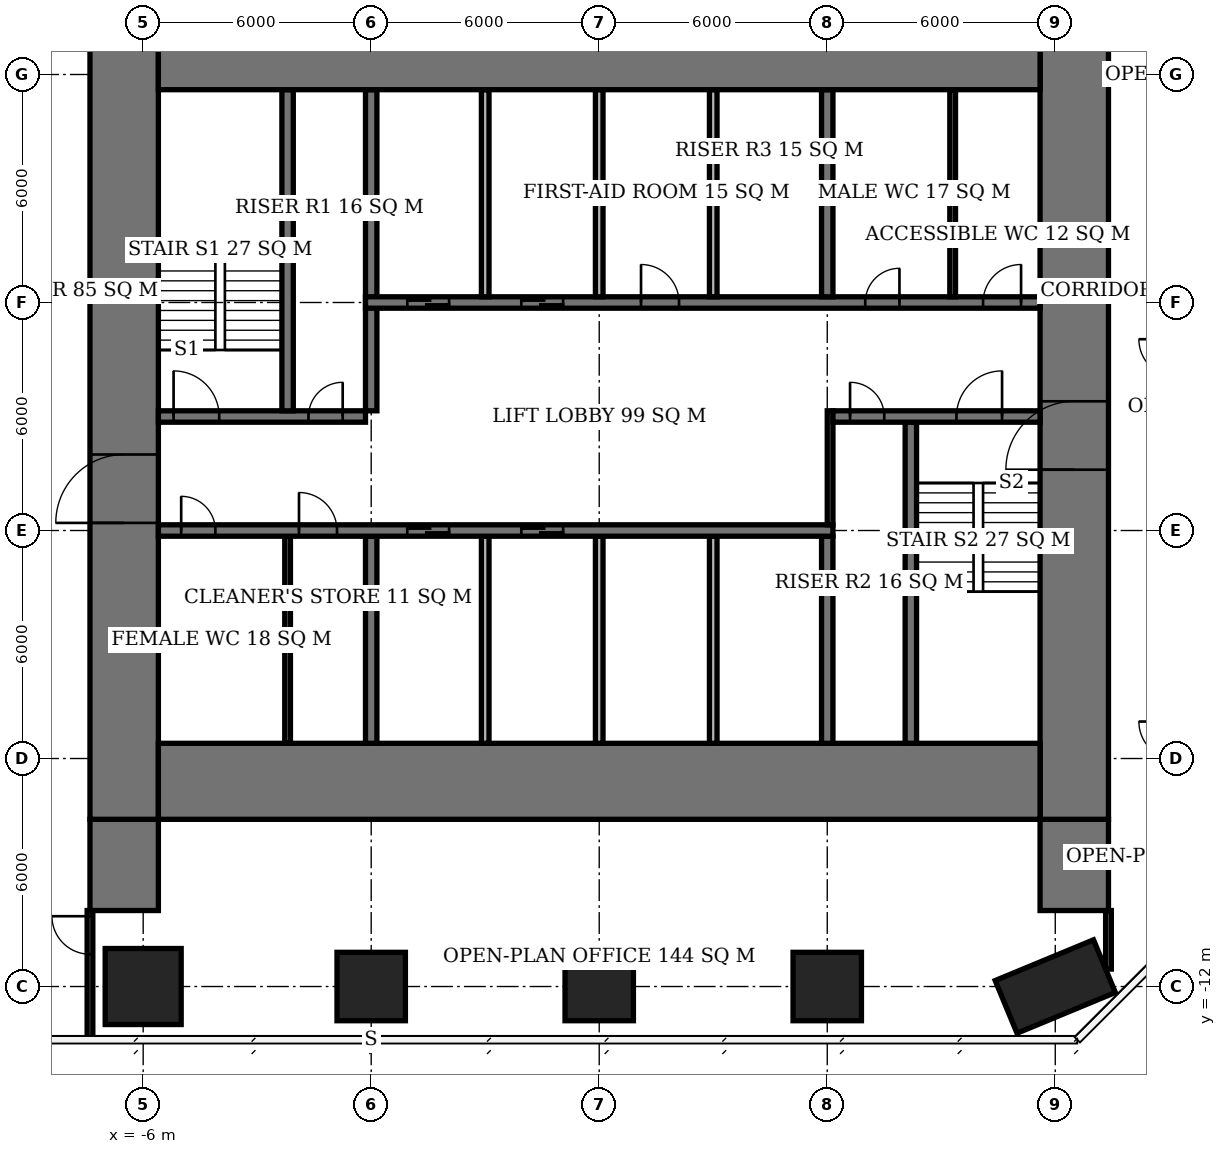
"""IFC4 building model, lengths in metres.
Left out: names, types, materials, properties, quantities, classifications, styles, units other than length and angle.
Written with IfcOpenShell. Run it as: python <this file> out.ifc"""

import sys

from ifc_helpers import new_model, si_unit, direction, frame, frame_2d, origin, origin_2d, place, context, subcontext, project, spatial, rectangle, extrude, element, fill, save


model = new_model("IFC4")
c1 = context("Model", 3, precision=1e-05, world=origin(), true_north=direction((0.0, 1.0)))
c2 = subcontext(c1, "Body", "Model", "MODEL_VIEW")
j1 = project(units=[si_unit("LENGTHUNIT", "METRE"), si_unit("PLANEANGLEUNIT", "RADIAN")], contexts=[c1])
p1 = place(None, origin())
s1 = spatial("IfcSite", under=j1, at=p1, CompositionType="ELEMENT")
p2 = place(p1, origin())
s2 = spatial("IfcBuilding", under=s1, at=p2, CompositionType="ELEMENT")
p3 = place(p2, frame((0.0, 0.0, 101.6)))
s3 = spatial("IfcBuildingStorey", under=s2, at=p3, CompositionType="ELEMENT", Elevation=101.6)
p4 = place(p3, frame((-6.0, -12.0, 0.0), z_axis=(0.0, 0.0, 1.0), x_axis=(1.0, 0.0, 0.0)))
e1 = element("IfcColumn", 1, at=p4, inside=s3, PredefinedType="COLUMN", context=c2, shape_type="SweptSolid", body=[
    extrude(rectangle(XDim=2.0, YDim=2.0, at=origin_2d()), origin(), (0.0, 0.0, 1.0), 3.9),
])
for number, where, z_axis, x_axis in (
    (2, (0.0, -12.0, 0.0), (0.0, 0.0, 1.0), (1.0, 0.0, 0.0)),
    (3, (6.0, -12.0, 0.0), (0.0, 0.0, 1.0), (1.0, 0.0, 0.0)),
    (4, (12.0, -12.0, 0.0), (0.0, 0.0, 1.0), (1.0, 0.0, 0.0)),
):
    element("IfcColumn", number, at=place(p3, frame(where, z_axis=z_axis, x_axis=x_axis)), inside=s3, PredefinedType="COLUMN", context=c2, shape_type="SweptSolid", body=[
        extrude(rectangle(XDim=1.8, YDim=1.8, at=origin_2d()), origin(), (0.0, 0.0, 1.0), 3.9),
    ])
p5 = place(p3, frame((18.0, -12.0, 0.0), z_axis=(0.0, 0.0, 1.0), x_axis=(-0.923879532511, -0.382683432365, 0.0)))
e5 = element("IfcColumn", 5, at=p5, inside=s3, PredefinedType="COLUMN", context=c2, shape_type="SweptSolid", body=[
    extrude(rectangle(XDim=2.8, YDim=1.5, at=origin_2d()), origin(), (0.0, 0.0, 1.0), 3.9),
])
for number, where, z_axis, x_axis in (
    (6, (-5.6, -6.6, 0.0), (0.0, 0.0, 1.0), (1.0, 0.0, 0.0)),
    (7, (-5.6, 12.6, 0.0), (0.0, 0.0, 1.0), (1.0, 0.0, 0.0)),
):
    element("IfcWall", number, at=place(p3, frame(where, z_axis=z_axis, x_axis=x_axis)), inside=s3, PredefinedType="SHEAR", context=c2, shape_type="SweptSolid", body=[
        extrude(rectangle(XDim=23.2, YDim=2.0, at=frame_2d((11.6, 0.0))), origin(), (0.0, 0.0, 1.0), 3.9),
    ])
p6 = place(p3, frame((-6.5, -7.6, 0.0), z_axis=(0.0, 0.0, 1.0), x_axis=(0.0, 1.0, 0.0)))
e8 = element("IfcWall", 8, at=p6, inside=s3, PredefinedType="SHEAR", context=c2, shape_type="SweptSolid", body=[
    extrude(rectangle(XDim=21.2, YDim=1.8, at=frame_2d((10.6, 0.0))), origin(), (0.0, 0.0, 1.0), 3.9),
])
p7 = place(p6, frame((7.8, 0.0, 0.0)))
e9 = element("IfcOpeningElement", 9, at=p7, cuts=e8, PredefinedType="OPENING", context=c2, shape_type="SweptSolid", body=[
    extrude(rectangle(XDim=1.8, YDim=2.4, at=frame_2d((0.9, 1.2))), frame((0.0, 0.91, 0.0), z_axis=(0.0, -1.0, 0.0), x_axis=(1.0, 0.0, 0.0)), (0.0, 0.0, 1.0), 1.82),
])
p8 = place(p3, frame((18.5, -7.6, 0.0), z_axis=(0.0, 0.0, 1.0), x_axis=(0.0, 1.0, 0.0)))
e10 = element("IfcWall", 10, at=p8, inside=s3, PredefinedType="SHEAR", context=c2, shape_type="SweptSolid", body=[
    extrude(rectangle(XDim=21.2, YDim=1.8, at=frame_2d((10.6, 0.0))), origin(), (0.0, 0.0, 1.0), 3.9),
])
p9 = place(p8, frame((9.2, 0.0, 0.0)))
e11 = element("IfcOpeningElement", 11, at=p9, cuts=e10, PredefinedType="OPENING", context=c2, shape_type="SweptSolid", body=[
    extrude(rectangle(XDim=1.8, YDim=2.4, at=frame_2d((0.9, 1.2))), frame((0.0, 0.91, 0.0), z_axis=(0.0, -1.0, 0.0), x_axis=(1.0, 0.0, 0.0)), (0.0, 0.0, 1.0), 1.82),
])
for number, where, z_axis, x_axis in (
    (12, (-6.5, -10.0, 0.0), (0.0, 0.0, 1.0), (0.0, 1.0, 0.0)),
    (13, (18.5, -10.0, 0.0), (0.0, 0.0, 1.0), (0.0, 1.0, 0.0)),
):
    element("IfcWall", number, at=place(p3, frame(where, z_axis=z_axis, x_axis=x_axis)), inside=s3, PredefinedType="SHEAR", context=c2, shape_type="SweptSolid", body=[
        extrude(rectangle(XDim=2.4, YDim=1.8, at=frame_2d((1.2, 0.0))), origin(), (0.0, 0.0, 1.0), 3.9),
    ])
p10 = place(p3, frame((-5.6, 0.0, 0.0), z_axis=(0.0, 0.0, 1.0), x_axis=(1.0, 0.0, 0.0)))
e14 = element("IfcWall", 14, at=p10, inside=s3, PredefinedType="SHEAR", context=c2, shape_type="SweptSolid", body=[
    extrude(rectangle(XDim=17.75, YDim=0.3, at=frame_2d((8.875, 0.0))), origin(), (0.0, 0.0, 1.0), 3.9),
])
p11 = place(p10, frame((0.6, 0.0, 0.0)))
e15 = element("IfcOpeningElement", 15, at=p11, cuts=e14, PredefinedType="OPENING", context=c2, shape_type="SweptSolid", body=[
    extrude(rectangle(XDim=0.9, YDim=2.1, at=frame_2d((0.45, 1.05))), frame((0.0, 0.16, 0.0), z_axis=(0.0, -1.0, 0.0), x_axis=(1.0, 0.0, 0.0)), (0.0, 0.0, 1.0), 0.32),
])
p12 = place(p10, frame((3.7, 0.0, 0.0)))
e16 = element("IfcOpeningElement", 16, at=p12, cuts=e14, PredefinedType="OPENING", context=c2, shape_type="SweptSolid", body=[
    extrude(rectangle(XDim=1.0, YDim=2.1, at=frame_2d((0.5, 1.05))), frame((0.0, 0.16, 0.0), z_axis=(0.0, -1.0, 0.0), x_axis=(1.0, 0.0, 0.0)), (0.0, 0.0, 1.0), 0.32),
])
p13 = place(p10, frame((6.55, 0.0, 0.0)))
e17 = element("IfcOpeningElement", 17, at=p13, cuts=e14, PredefinedType="OPENING", context=c2, shape_type="SweptSolid", body=[
    extrude(rectangle(XDim=1.1, YDim=2.1, at=frame_2d((0.55, 1.05))), frame((0.0, 0.16, 0.0), z_axis=(0.0, -1.0, 0.0), x_axis=(1.0, 0.0, 0.0)), (0.0, 0.0, 1.0), 0.32),
])
p14 = place(p10, frame((9.55, 0.0, 0.0)))
e18 = element("IfcOpeningElement", 18, at=p14, cuts=e14, PredefinedType="OPENING", context=c2, shape_type="SweptSolid", body=[
    extrude(rectangle(XDim=1.1, YDim=2.1, at=frame_2d((0.55, 1.05))), frame((0.0, 0.16, 0.0), z_axis=(0.0, -1.0, 0.0), x_axis=(1.0, 0.0, 0.0)), (0.0, 0.0, 1.0), 0.32),
])
p15 = place(p3, frame((-5.6, 3.0, 0.0), z_axis=(0.0, 0.0, 1.0), x_axis=(1.0, 0.0, 0.0)))
e19 = element("IfcWall", 19, at=p15, inside=s3, PredefinedType="SHEAR", context=c2, shape_type="SweptSolid", body=[
    extrude(rectangle(XDim=5.45, YDim=0.3, at=frame_2d((2.725, 0.0))), origin(), (0.0, 0.0, 1.0), 3.9),
])
p16 = place(p15, frame((0.4, 0.0, 0.0)))
e20 = element("IfcOpeningElement", 20, at=p16, cuts=e19, PredefinedType="OPENING", context=c2, shape_type="SweptSolid", body=[
    extrude(rectangle(XDim=1.2, YDim=2.1, at=frame_2d((0.6, 1.05))), frame((0.0, 0.16, 0.0), z_axis=(0.0, -1.0, 0.0), x_axis=(1.0, 0.0, 0.0)), (0.0, 0.0, 1.0), 0.32),
])
p17 = place(p15, frame((3.95, 0.0, 0.0)))
e21 = element("IfcOpeningElement", 21, at=p17, cuts=e19, PredefinedType="OPENING", context=c2, shape_type="SweptSolid", body=[
    extrude(rectangle(XDim=0.9, YDim=2.1, at=frame_2d((0.45, 1.05))), frame((0.0, 0.16, 0.0), z_axis=(0.0, -1.0, 0.0), x_axis=(1.0, 0.0, 0.0)), (0.0, 0.0, 1.0), 0.32),
])
p18 = place(p3, frame((12.15, 3.0, 0.0), z_axis=(0.0, 0.0, 1.0), x_axis=(1.0, 0.0, 0.0)))
e22 = element("IfcWall", 22, at=p18, inside=s3, PredefinedType="SHEAR", context=c2, shape_type="SweptSolid", body=[
    extrude(rectangle(XDim=5.45, YDim=0.3, at=frame_2d((2.725, 0.0))), origin(), (0.0, 0.0, 1.0), 3.9),
])
p19 = place(p18, frame((3.25, 0.0, 0.0)))
e23 = element("IfcOpeningElement", 23, at=p19, cuts=e22, PredefinedType="OPENING", context=c2, shape_type="SweptSolid", body=[
    extrude(rectangle(XDim=1.2, YDim=2.1, at=frame_2d((0.6, 1.05))), frame((0.0, 0.16, 0.0), z_axis=(0.0, -1.0, 0.0), x_axis=(1.0, 0.0, 0.0)), (0.0, 0.0, 1.0), 0.32),
])
p20 = place(p18, frame((0.45, 0.0, 0.0)))
e24 = element("IfcOpeningElement", 24, at=p20, cuts=e22, PredefinedType="OPENING", context=c2, shape_type="SweptSolid", body=[
    extrude(rectangle(XDim=0.9, YDim=2.1, at=frame_2d((0.45, 1.05))), frame((0.0, 0.16, 0.0), z_axis=(0.0, -1.0, 0.0), x_axis=(1.0, 0.0, 0.0)), (0.0, 0.0, 1.0), 0.32),
])
p21 = place(p3, frame((-0.15, 6.0, 0.0), z_axis=(0.0, 0.0, 1.0), x_axis=(1.0, 0.0, 0.0)))
e25 = element("IfcWall", 25, at=p21, inside=s3, PredefinedType="SHEAR", context=c2, shape_type="SweptSolid", body=[
    extrude(rectangle(XDim=17.75, YDim=0.3, at=frame_2d((8.875, 0.0))), origin(), (0.0, 0.0, 1.0), 3.9),
])
p22 = place(p21, frame((13.15, 0.0, 0.0)))
e26 = element("IfcOpeningElement", 26, at=p22, cuts=e25, PredefinedType="OPENING", context=c2, shape_type="SweptSolid", body=[
    extrude(rectangle(XDim=0.9, YDim=2.1, at=frame_2d((0.45, 1.05))), frame((0.0, 0.16, 0.0), z_axis=(0.0, -1.0, 0.0), x_axis=(1.0, 0.0, 0.0)), (0.0, 0.0, 1.0), 0.32),
])
p23 = place(p21, frame((16.25, 0.0, 0.0)))
e27 = element("IfcOpeningElement", 27, at=p23, cuts=e25, PredefinedType="OPENING", context=c2, shape_type="SweptSolid", body=[
    extrude(rectangle(XDim=1.0, YDim=2.1, at=frame_2d((0.5, 1.05))), frame((0.0, 0.16, 0.0), z_axis=(0.0, -1.0, 0.0), x_axis=(1.0, 0.0, 0.0)), (0.0, 0.0, 1.0), 0.32),
])
p24 = place(p21, frame((7.25, 0.0, 0.0)))
e28 = element("IfcOpeningElement", 28, at=p24, cuts=e25, PredefinedType="OPENING", context=c2, shape_type="SweptSolid", body=[
    extrude(rectangle(XDim=1.0, YDim=2.1, at=frame_2d((0.5, 1.05))), frame((0.0, 0.16, 0.0), z_axis=(0.0, -1.0, 0.0), x_axis=(1.0, 0.0, 0.0)), (0.0, 0.0, 1.0), 0.32),
])
p25 = place(p21, frame((1.1, 0.0, 0.0)))
e29 = element("IfcOpeningElement", 29, at=p25, cuts=e25, PredefinedType="OPENING", context=c2, shape_type="SweptSolid", body=[
    extrude(rectangle(XDim=1.1, YDim=2.1, at=frame_2d((0.55, 1.05))), frame((0.0, 0.16, 0.0), z_axis=(0.0, -1.0, 0.0), x_axis=(1.0, 0.0, 0.0)), (0.0, 0.0, 1.0), 0.32),
])
p26 = place(p21, frame((4.1, 0.0, 0.0)))
e30 = element("IfcOpeningElement", 30, at=p26, cuts=e25, PredefinedType="OPENING", context=c2, shape_type="SweptSolid", body=[
    extrude(rectangle(XDim=1.1, YDim=2.1, at=frame_2d((0.55, 1.05))), frame((0.0, 0.16, 0.0), z_axis=(0.0, -1.0, 0.0), x_axis=(1.0, 0.0, 0.0)), (0.0, 0.0, 1.0), 0.32),
])
p27 = place(p3, frame((0.0, -5.6, 0.0), z_axis=(0.0, 0.0, 1.0), x_axis=(0.0, 1.0, 0.0)))
e31 = element("IfcWall", 31, at=p27, inside=s3, PredefinedType="SHEAR", context=c2, shape_type="SweptSolid", body=[
    extrude(rectangle(XDim=5.45, YDim=0.3, at=frame_2d((2.725, 0.0))), origin(), (0.0, 0.0, 1.0), 3.9),
])
p28 = place(p3, frame((0.0, 3.15, 0.0), z_axis=(0.0, 0.0, 1.0), x_axis=(0.0, 1.0, 0.0)))
e32 = element("IfcWall", 32, at=p28, inside=s3, PredefinedType="SHEAR", context=c2, shape_type="SweptSolid", body=[
    extrude(rectangle(XDim=8.45, YDim=0.3, at=frame_2d((4.225, 0.0))), origin(), (0.0, 0.0, 1.0), 3.9),
])
for number, where, z_axis, x_axis in (
    (33, (12.0, -5.6, 0.0), (0.0, 0.0, 1.0), (0.0, 1.0, 0.0)),
    (34, (12.0, 6.15, 0.0), (0.0, 0.0, 1.0), (0.0, 1.0, 0.0)),
):
    element("IfcWall", number, at=place(p3, frame(where, z_axis=z_axis, x_axis=x_axis)), inside=s3, PredefinedType="SHEAR", context=c2, shape_type="SweptSolid", body=[
        extrude(rectangle(XDim=5.45, YDim=0.3, at=frame_2d((2.725, 0.0))), origin(), (0.0, 0.0, 1.0), 3.9),
    ])
for number, where, z_axis, x_axis in (
    (35, (-2.2, 3.15, 0.0), (0.0, 0.0, 1.0), (0.0, 1.0, 0.0)),
    (36, (14.2, -5.6, 0.0), (0.0, 0.0, 1.0), (0.0, 1.0, 0.0)),
):
    element("IfcWall", number, at=place(p3, frame(where, z_axis=z_axis, x_axis=x_axis)), inside=s3, PredefinedType="SHEAR", context=c2, shape_type="SweptSolid", body=[
        extrude(rectangle(XDim=8.45, YDim=0.3, at=frame_2d((4.225, 0.0))), origin(), (0.0, 0.0, 1.0), 3.9),
    ])
for number, where, z_axis, x_axis in (
    (37, (3.0, 6.15, 0.0), (0.0, 0.0, 1.0), (0.0, 1.0, 0.0)),
    (38, (6.0, 6.15, 0.0), (0.0, 0.0, 1.0), (0.0, 1.0, 0.0)),
    (39, (9.0, 6.15, 0.0), (0.0, 0.0, 1.0), (0.0, 1.0, 0.0)),
    (40, (3.0, -5.6, 0.0), (0.0, 0.0, 1.0), (0.0, 1.0, 0.0)),
    (41, (6.0, -5.6, 0.0), (0.0, 0.0, 1.0), (0.0, 1.0, 0.0)),
    (42, (9.0, -5.6, 0.0), (0.0, 0.0, 1.0), (0.0, 1.0, 0.0)),
):
    element("IfcWall", number, at=place(p3, frame(where, z_axis=z_axis, x_axis=x_axis)), inside=s3, PredefinedType="SOLIDWALL", context=c2, shape_type="SweptSolid", body=[
        extrude(rectangle(XDim=5.45, YDim=0.2, at=frame_2d((2.725, 0.0))), origin(), (0.0, 0.0, 1.0), 3.9),
    ])
for number, where, z_axis, x_axis in (
    (43, (-2.2, -5.6, 0.0), (0.0, 0.0, 1.0), (0.0, 1.0, 0.0)),
    (44, (15.3, 6.15, 0.0), (0.0, 0.0, 1.0), (0.0, 1.0, 0.0)),
):
    element("IfcWall", number, at=place(p3, frame(where, z_axis=z_axis, x_axis=x_axis)), inside=s3, PredefinedType="PLUMBINGWALL", context=c2, shape_type="SweptSolid", body=[
        extrude(rectangle(XDim=5.45, YDim=0.15, at=frame_2d((2.725, 0.0))), origin(), (0.0, 0.0, 1.0), 3.65),
    ])
p29 = place(p3, frame((-7.4, -13.4, 0.0), z_axis=(0.0, 0.0, 1.0), x_axis=(0.0, 1.0, 0.0)))
e45 = element("IfcWall", 45, at=p29, inside=s3, PredefinedType="PARTITIONING", context=c2, shape_type="SweptSolid", body=[
    extrude(rectangle(XDim=3.4, YDim=0.15, at=frame_2d((1.7, 0.0))), origin(), (0.0, 0.0, 1.0), 3.65),
])
p30 = place(p29, frame((2.25, 0.0, 0.0)))
e46 = element("IfcOpeningElement", 46, at=p30, cuts=e45, PredefinedType="OPENING", context=c2, shape_type="SweptSolid", body=[
    extrude(rectangle(XDim=1.0, YDim=2.1, at=frame_2d((0.5, 1.05))), frame((0.0, 0.085, 0.0), z_axis=(0.0, -1.0, 0.0), x_axis=(1.0, 0.0, 0.0)), (0.0, 0.0, 1.0), 0.17),
])
p31 = place(p3, frame((19.4, -11.541, 0.0), z_axis=(0.0, 0.0, 1.0), x_axis=(0.0, 1.0, 0.0)))
e47 = element("IfcWall", 47, at=p31, inside=s3, PredefinedType="PARTITIONING", context=c2, shape_type="SweptSolid", body=[
    extrude(rectangle(XDim=1.541, YDim=0.15, at=frame_2d((0.77, 0.0))), origin(), (0.0, 0.0, 1.0), 3.65),
])
p32 = place(p3, frame((12.075, 0.15, 0.0), z_axis=(0.0, 0.0, 1.0), x_axis=(0.0, 1.0, 0.0)))
e48 = element("IfcWall", 48, at=p32, inside=s3, PredefinedType="PARTITIONING", context=c2, shape_type="SweptSolid", body=[
    extrude(rectangle(XDim=3.0, YDim=0.15, at=frame_2d((1.5, 0.0))), origin(), (0.0, 0.0, 1.0), 3.65),
])
p33 = place(p7, origin())
e49 = element("IfcDoor", 49, at=p33, inside=s3, OperationType="DOUBLE_DOOR_SINGLE_SWING", PredefinedType="DOOR", context=c2, shape_type="SweptSolid", body=[
    extrude(rectangle(XDim=1.8, YDim=2.4, at=frame_2d((0.9, 1.2))), frame((0.0, 0.025, 0.0), z_axis=(0.0, -1.0, 0.0), x_axis=(1.0, 0.0, 0.0)), (0.0, 0.0, 1.0), 0.05),
])
fill(e9, e49)
p34 = place(p9, origin())
e50 = element("IfcDoor", 50, at=p34, inside=s3, OperationType="DOUBLE_DOOR_SINGLE_SWING", PredefinedType="DOOR", context=c2, shape_type="SweptSolid", body=[
    extrude(rectangle(XDim=1.8, YDim=2.4, at=frame_2d((0.9, 1.2))), frame((0.0, 0.025, 0.0), z_axis=(0.0, -1.0, 0.0), x_axis=(1.0, 0.0, 0.0)), (0.0, 0.0, 1.0), 0.05),
])
fill(e11, e50)
p35 = place(p16, origin())
e51 = element("IfcDoor", 51, at=p35, inside=s3, OperationType="SINGLE_SWING_LEFT", PredefinedType="DOOR", context=c2, shape_type="SweptSolid", body=[
    extrude(rectangle(XDim=1.2, YDim=2.1, at=frame_2d((0.6, 1.05))), frame((0.0, 0.025, 0.0), z_axis=(0.0, -1.0, 0.0), x_axis=(1.0, 0.0, 0.0)), (0.0, 0.0, 1.0), 0.05),
])
fill(e20, e51)
p36 = place(p17, origin())
e52 = element("IfcDoor", 52, at=p36, inside=s3, OperationType="SINGLE_SWING_RIGHT", PredefinedType="DOOR", context=c2, shape_type="SweptSolid", body=[
    extrude(rectangle(XDim=0.9, YDim=2.1, at=frame_2d((0.45, 1.05))), frame((0.0, 0.025, 0.0), z_axis=(0.0, -1.0, 0.0), x_axis=(1.0, 0.0, 0.0)), (0.0, 0.0, 1.0), 0.05),
])
fill(e21, e52)
p37 = place(p19, origin())
e53 = element("IfcDoor", 53, at=p37, inside=s3, OperationType="SINGLE_SWING_RIGHT", PredefinedType="DOOR", context=c2, shape_type="SweptSolid", body=[
    extrude(rectangle(XDim=1.2, YDim=2.1, at=frame_2d((0.6, 1.05))), frame((0.0, 0.025, 0.0), z_axis=(0.0, -1.0, 0.0), x_axis=(1.0, 0.0, 0.0)), (0.0, 0.0, 1.0), 0.05),
])
fill(e23, e53)
p38 = place(p20, origin())
e54 = element("IfcDoor", 54, at=p38, inside=s3, OperationType="SINGLE_SWING_LEFT", PredefinedType="DOOR", context=c2, shape_type="SweptSolid", body=[
    extrude(rectangle(XDim=0.9, YDim=2.1, at=frame_2d((0.45, 1.05))), frame((0.0, 0.025, 0.0), z_axis=(0.0, -1.0, 0.0), x_axis=(1.0, 0.0, 0.0)), (0.0, 0.0, 1.0), 0.05),
])
fill(e24, e54)
p39 = place(p11, origin())
e55 = element("IfcDoor", 55, at=p39, inside=s3, OperationType="SINGLE_SWING_LEFT", PredefinedType="DOOR", context=c2, shape_type="SweptSolid", body=[
    extrude(rectangle(XDim=0.9, YDim=2.1, at=frame_2d((0.45, 1.05))), frame((0.0, 0.025, 0.0), z_axis=(0.0, -1.0, 0.0), x_axis=(1.0, 0.0, 0.0)), (0.0, 0.0, 1.0), 0.05),
])
fill(e15, e55)
p40 = place(p12, origin())
e56 = element("IfcDoor", 56, at=p40, inside=s3, OperationType="SINGLE_SWING_LEFT", PredefinedType="DOOR", context=c2, shape_type="SweptSolid", body=[
    extrude(rectangle(XDim=1.0, YDim=2.1, at=frame_2d((0.5, 1.05))), frame((0.0, 0.025, 0.0), z_axis=(0.0, -1.0, 0.0), x_axis=(1.0, 0.0, 0.0)), (0.0, 0.0, 1.0), 0.05),
])
fill(e16, e56)
p41 = place(p22, origin())
e57 = element("IfcDoor", 57, at=p41, inside=s3, OperationType="SINGLE_SWING_RIGHT", PredefinedType="DOOR", context=c2, shape_type="SweptSolid", body=[
    extrude(rectangle(XDim=0.9, YDim=2.1, at=frame_2d((0.45, 1.05))), frame((0.0, 0.025, 0.0), z_axis=(0.0, -1.0, 0.0), x_axis=(1.0, 0.0, 0.0)), (0.0, 0.0, 1.0), 0.05),
])
fill(e26, e57)
p42 = place(p23, origin())
e58 = element("IfcDoor", 58, at=p42, inside=s3, OperationType="SINGLE_SWING_RIGHT", PredefinedType="DOOR", context=c2, shape_type="SweptSolid", body=[
    extrude(rectangle(XDim=1.0, YDim=2.1, at=frame_2d((0.5, 1.05))), frame((0.0, 0.025, 0.0), z_axis=(0.0, -1.0, 0.0), x_axis=(1.0, 0.0, 0.0)), (0.0, 0.0, 1.0), 0.05),
])
fill(e27, e58)
p43 = place(p24, origin())
e59 = element("IfcDoor", 59, at=p43, inside=s3, OperationType="SINGLE_SWING_LEFT", PredefinedType="DOOR", context=c2, shape_type="SweptSolid", body=[
    extrude(rectangle(XDim=1.0, YDim=2.1, at=frame_2d((0.5, 1.05))), frame((0.0, 0.025, 0.0), z_axis=(0.0, -1.0, 0.0), x_axis=(1.0, 0.0, 0.0)), (0.0, 0.0, 1.0), 0.05),
])
fill(e28, e59)
p44 = place(p25, origin())
e60 = element("IfcDoor", 60, at=p44, inside=s3, OperationType="DOUBLE_DOOR_SLIDING", PredefinedType="USERDEFINED", context=c2, shape_type="SweptSolid", body=[
    extrude(rectangle(XDim=1.1, YDim=2.1, at=frame_2d((0.55, 1.05))), frame((0.0, 0.025, 0.0), z_axis=(0.0, -1.0, 0.0), x_axis=(1.0, 0.0, 0.0)), (0.0, 0.0, 1.0), 0.05),
])
fill(e29, e60)
p45 = place(p26, origin())
e61 = element("IfcDoor", 61, at=p45, inside=s3, OperationType="DOUBLE_DOOR_SLIDING", PredefinedType="USERDEFINED", context=c2, shape_type="SweptSolid", body=[
    extrude(rectangle(XDim=1.1, YDim=2.1, at=frame_2d((0.55, 1.05))), frame((0.0, 0.025, 0.0), z_axis=(0.0, -1.0, 0.0), x_axis=(1.0, 0.0, 0.0)), (0.0, 0.0, 1.0), 0.05),
])
fill(e30, e61)
p46 = place(p13, origin())
e62 = element("IfcDoor", 62, at=p46, inside=s3, OperationType="DOUBLE_DOOR_SLIDING", PredefinedType="USERDEFINED", context=c2, shape_type="SweptSolid", body=[
    extrude(rectangle(XDim=1.1, YDim=2.1, at=frame_2d((0.55, 1.05))), frame((0.0, 0.025, 0.0), z_axis=(0.0, -1.0, 0.0), x_axis=(1.0, 0.0, 0.0)), (0.0, 0.0, 1.0), 0.05),
])
fill(e17, e62)
p47 = place(p14, origin())
e63 = element("IfcDoor", 63, at=p47, inside=s3, OperationType="DOUBLE_DOOR_SLIDING", PredefinedType="USERDEFINED", context=c2, shape_type="SweptSolid", body=[
    extrude(rectangle(XDim=1.1, YDim=2.1, at=frame_2d((0.55, 1.05))), frame((0.0, 0.025, 0.0), z_axis=(0.0, -1.0, 0.0), x_axis=(1.0, 0.0, 0.0)), (0.0, 0.0, 1.0), 0.05),
])
fill(e18, e63)
p48 = place(p30, origin())
e64 = element("IfcDoor", 64, at=p48, inside=s3, OperationType="SINGLE_SWING_RIGHT", PredefinedType="DOOR", context=c2, shape_type="SweptSolid", body=[
    extrude(rectangle(XDim=1.0, YDim=2.1, at=frame_2d((0.5, 1.05))), frame((0.0, 0.025, 0.0), z_axis=(0.0, -1.0, 0.0), x_axis=(1.0, 0.0, 0.0)), (0.0, 0.0, 1.0), 0.05),
])
fill(e46, e64)
save(model, sys.argv[1])
